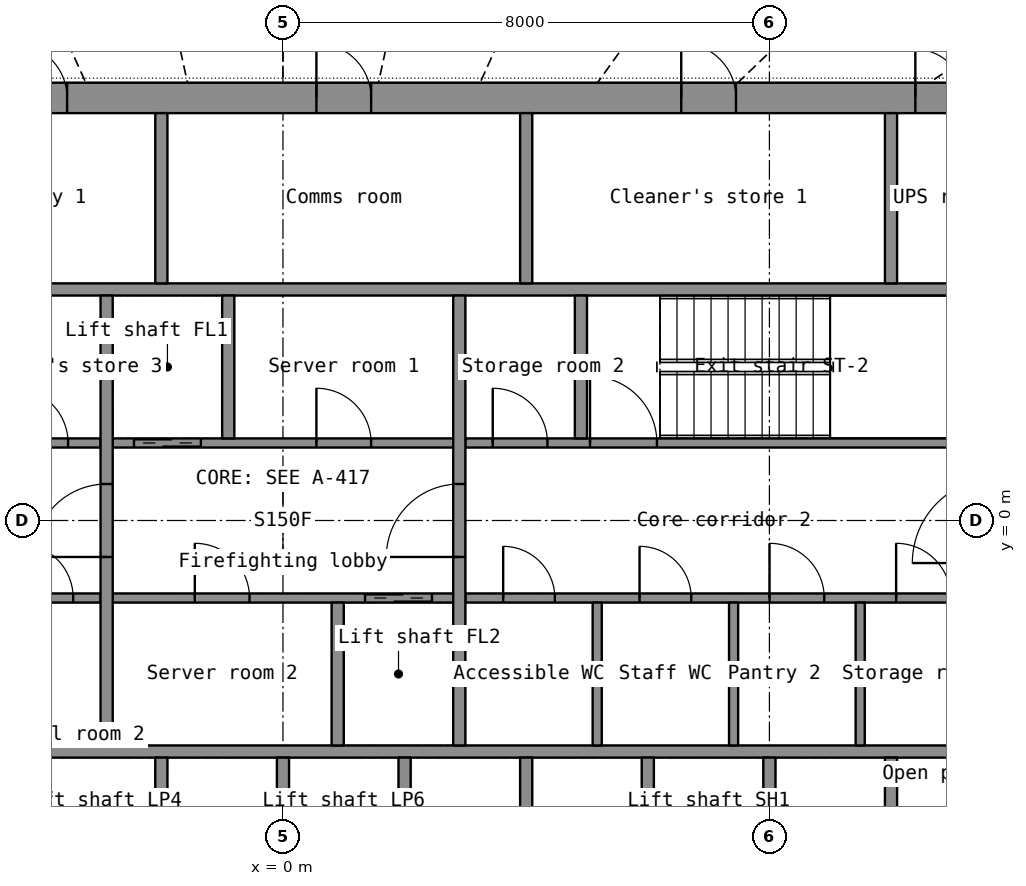
"""IFC4 building model, lengths in metres.
Left out: names, types, materials, properties, quantities, classifications, styles, units other than length and angle.
Written with IfcOpenShell. Run it as: python <this file> out.ifc"""

import sys

from ifc_helpers import new_model, si_unit, direction, frame, frame_2d, origin, place, context, subcontext, project, spatial, rectangle, extrude, element, fill, save


model = new_model("IFC4")
c1 = context("Model", 3, precision=1e-05, world=origin(), true_north=direction((0.0, 1.0)))
c2 = subcontext(c1, "Body", "Model", "MODEL_VIEW")
j1 = project(units=[si_unit("LENGTHUNIT", "METRE"), si_unit("PLANEANGLEUNIT", "RADIAN")], contexts=[c1])
p1 = place(None, origin())
s1 = spatial("IfcSite", under=j1, at=p1, CompositionType="ELEMENT")
p2 = place(p1, origin())
s2 = spatial("IfcBuilding", under=s1, at=p2, CompositionType="ELEMENT")
p3 = place(p2, frame((0.0, 0.0, 123.0)))
s3 = spatial("IfcBuildingStorey", under=s2, at=p3, CompositionType="ELEMENT", Elevation=123.0)
p4 = place(p3, frame((-11.5, 6.95, 0.0), z_axis=(0.0, 0.0, 1.0), x_axis=(1.0, 0.0, 0.0)))
e1 = element("IfcWall", 1, at=p4, inside=s3, PredefinedType="SHEAR", context=c2, shape_type="SweptSolid", body=[
    extrude(rectangle(XDim=23.0, YDim=0.5, at=frame_2d((11.5, 0.0))), origin(), (0.0, 0.0, 1.0), 3.3),
])
p5 = place(p4, frame((1.95, 0.0, 0.0)))
e2 = element("IfcOpeningElement", 2, at=p5, cuts=e1, PredefinedType="OPENING", context=c2, shape_type="SweptSolid", body=[
    extrude(rectangle(XDim=1.1, YDim=2.2, at=frame_2d((0.55, 1.1))), frame((0.0, 0.26, 0.0), z_axis=(0.0, -1.0, 0.0), x_axis=(1.0, 0.0, 0.0)), (0.0, 0.0, 1.0), 0.52),
])
p6 = place(p4, frame((7.05, 0.0, 0.0)))
e3 = element("IfcOpeningElement", 3, at=p6, cuts=e1, PredefinedType="OPENING", context=c2, shape_type="SweptSolid", body=[
    extrude(rectangle(XDim=0.9, YDim=2.1, at=frame_2d((0.45, 1.05))), frame((0.0, 0.26, 0.0), z_axis=(0.0, -1.0, 0.0), x_axis=(1.0, 0.0, 0.0)), (0.0, 0.0, 1.0), 0.52),
])
p7 = place(p4, frame((12.05, 0.0, 0.0)))
e4 = element("IfcOpeningElement", 4, at=p7, cuts=e1, PredefinedType="OPENING", context=c2, shape_type="SweptSolid", body=[
    extrude(rectangle(XDim=0.9, YDim=2.1, at=frame_2d((0.45, 1.05))), frame((0.0, 0.26, 0.0), z_axis=(0.0, -1.0, 0.0), x_axis=(1.0, 0.0, 0.0)), (0.0, 0.0, 1.0), 0.52),
])
p8 = place(p4, frame((18.05, 0.0, 0.0)))
e5 = element("IfcOpeningElement", 5, at=p8, cuts=e1, PredefinedType="OPENING", context=c2, shape_type="SweptSolid", body=[
    extrude(rectangle(XDim=0.9, YDim=2.1, at=frame_2d((0.45, 1.05))), frame((0.0, 0.26, 0.0), z_axis=(0.0, -1.0, 0.0), x_axis=(1.0, 0.0, 0.0)), (0.0, 0.0, 1.0), 0.52),
])
p9 = place(p4, frame((0.3, 0.0, 0.0)))
e6 = element("IfcOpeningElement", 6, at=p9, cuts=e1, PredefinedType="OPENING", context=c2, shape_type="SweptSolid", body=[
    extrude(rectangle(XDim=0.8, YDim=2.05, at=frame_2d((0.4, 1.025))), frame((0.0, 0.26, 0.0), z_axis=(0.0, -1.0, 0.0), x_axis=(1.0, 0.0, 0.0)), (0.0, 0.0, 1.0), 0.52),
])
p10 = place(p4, frame((21.9, 0.0, 0.0)))
e7 = element("IfcOpeningElement", 7, at=p10, cuts=e1, PredefinedType="OPENING", context=c2, shape_type="SweptSolid", body=[
    extrude(rectangle(XDim=0.8, YDim=2.05, at=frame_2d((0.4, 1.025))), frame((0.0, 0.26, 0.0), z_axis=(0.0, -1.0, 0.0), x_axis=(1.0, 0.0, 0.0)), (0.0, 0.0, 1.0), 0.52),
])
for number, where, z_axis, x_axis in (
    (8, (-11.5, -3.8, 0.0), (0.0, 0.0, 1.0), (1.0, 0.0, 0.0)),
    (9, (-11.5, 3.8, 0.0), (0.0, 0.0, 1.0), (1.0, 0.0, 0.0)),
):
    element("IfcWall", number, at=place(p3, frame(where, z_axis=z_axis, x_axis=x_axis)), inside=s3, PredefinedType="SHEAR", context=c2, shape_type="SweptSolid", body=[
        extrude(rectangle(XDim=23.0, YDim=0.2, at=frame_2d((11.5, 0.0))), origin(), (0.0, 0.0, 1.0), 3.3),
    ])
for number, where, z_axis, x_axis in (
    (10, (-2.0, -6.7, 0.0), (0.0, 0.0, 1.0), (0.0, 1.0, 0.0)),
    (11, (0.0, -6.7, 0.0), (0.0, 0.0, 1.0), (0.0, 1.0, 0.0)),
    (12, (2.0, -6.7, 0.0), (0.0, 0.0, 1.0), (0.0, 1.0, 0.0)),
    (13, (4.0, -6.7, 0.0), (0.0, 0.0, 1.0), (0.0, 1.0, 0.0)),
    (14, (6.0, -6.7, 0.0), (0.0, 0.0, 1.0), (0.0, 1.0, 0.0)),
    (15, (8.0, -6.7, 0.0), (0.0, 0.0, 1.0), (0.0, 1.0, 0.0)),
    (16, (10.0, -6.7, 0.0), (0.0, 0.0, 1.0), (0.0, 1.0, 0.0)),
    (17, (10.0, 3.9, 0.0), (0.0, 0.0, 1.0), (0.0, 1.0, 0.0)),
):
    element("IfcWall", number, at=place(p3, frame(where, z_axis=z_axis, x_axis=x_axis)), inside=s3, PredefinedType="SHEAR", context=c2, shape_type="SweptSolid", body=[
        extrude(rectangle(XDim=2.8, YDim=0.2, at=frame_2d((1.4, 0.0))), origin(), (0.0, 0.0, 1.0), 3.3),
    ])
for number, where, z_axis, x_axis in (
    (18, (-2.0, 3.9, 0.0), (0.0, 0.0, 1.0), (0.0, 1.0, 0.0)),
    (19, (4.0, 3.9, 0.0), (0.0, 0.0, 1.0), (0.0, 1.0, 0.0)),
):
    element("IfcWall", number, at=place(p3, frame(where, z_axis=z_axis, x_axis=x_axis)), inside=s3, PredefinedType="PARTITIONING", context=c2, shape_type="SweptSolid", body=[
        extrude(rectangle(XDim=2.8, YDim=0.2, at=frame_2d((1.4, 0.0))), origin(), (0.0, 0.0, 1.0), 3.3),
    ])
p11 = place(p3, frame((-11.5, -1.275, 0.0), z_axis=(0.0, 0.0, 1.0), x_axis=(1.0, 0.0, 0.0)))
e20 = element("IfcWall", 20, at=p11, inside=s3, PredefinedType="SHEAR", context=c2, shape_type="SweptSolid", body=[
    extrude(rectangle(XDim=8.5, YDim=0.15, at=frame_2d((4.25, 0.0))), origin(), (0.0, 0.0, 1.0), 3.3),
])
p12 = place(p11, frame((5.35, 0.0, 0.0)))
e21 = element("IfcOpeningElement", 21, at=p12, cuts=e20, PredefinedType="OPENING", context=c2, shape_type="SweptSolid", body=[
    extrude(rectangle(XDim=1.1, YDim=2.15, at=frame_2d((0.55, 1.075))), frame((0.0, 0.085, 0.0), z_axis=(0.0, -1.0, 0.0), x_axis=(1.0, 0.0, 0.0)), (0.0, 0.0, 1.0), 0.17),
])
p13 = place(p11, frame((7.15, 0.0, 0.0)))
e22 = element("IfcOpeningElement", 22, at=p13, cuts=e20, PredefinedType="OPENING", context=c2, shape_type="SweptSolid", body=[
    extrude(rectangle(XDim=0.9, YDim=2.1, at=frame_2d((0.45, 1.05))), frame((0.0, 0.085, 0.0), z_axis=(0.0, -1.0, 0.0), x_axis=(1.0, 0.0, 0.0)), (0.0, 0.0, 1.0), 0.17),
])
p14 = place(p3, frame((-2.8, -1.275, 0.0), z_axis=(0.0, 0.0, 1.0), x_axis=(1.0, 0.0, 0.0)))
e23 = element("IfcWall", 23, at=p14, inside=s3, PredefinedType="SHEAR", context=c2, shape_type="SweptSolid", body=[
    extrude(rectangle(XDim=5.6, YDim=0.15, at=frame_2d((2.8, 0.0))), origin(), (0.0, 0.0, 1.0), 3.3),
])
p15 = place(p14, frame((4.15, 0.0, 0.0)))
e24 = element("IfcOpeningElement", 24, at=p15, cuts=e23, PredefinedType="OPENING", context=c2, shape_type="SweptSolid", body=[
    extrude(rectangle(XDim=1.1, YDim=2.2, at=frame_2d((0.55, 1.1))), frame((0.0, 0.085, 0.0), z_axis=(0.0, -1.0, 0.0), x_axis=(1.0, 0.0, 0.0)), (0.0, 0.0, 1.0), 0.17),
])
p16 = place(p14, frame((1.35, 0.0, 0.0)))
e25 = element("IfcOpeningElement", 25, at=p16, cuts=e23, PredefinedType="OPENING", context=c2, shape_type="SweptSolid", body=[
    extrude(rectangle(XDim=0.9, YDim=2.1, at=frame_2d((0.45, 1.05))), frame((0.0, 0.085, 0.0), z_axis=(0.0, -1.0, 0.0), x_axis=(1.0, 0.0, 0.0)), (0.0, 0.0, 1.0), 0.17),
])
p17 = place(p3, frame((3.0, -1.275, 0.0), z_axis=(0.0, 0.0, 1.0), x_axis=(1.0, 0.0, 0.0)))
e26 = element("IfcWall", 26, at=p17, inside=s3, PredefinedType="PARTITIONING", context=c2, shape_type="SweptSolid", body=[
    extrude(rectangle(XDim=8.5, YDim=0.15, at=frame_2d((4.25, 0.0))), origin(), (0.0, 0.0, 1.0), 3.3),
])
p18 = place(p17, frame((0.622, 0.0, 0.0)))
e27 = element("IfcOpeningElement", 27, at=p18, cuts=e26, PredefinedType="OPENING", context=c2, shape_type="SweptSolid", body=[
    extrude(rectangle(XDim=0.85, YDim=2.1, at=frame_2d((0.425, 1.05))), frame((0.0, 0.085, 0.0), z_axis=(0.0, -1.0, 0.0), x_axis=(1.0, 0.0, 0.0)), (0.0, 0.0, 1.0), 0.17),
])
p19 = place(p17, frame((2.865, 0.0, 0.0)))
e28 = element("IfcOpeningElement", 28, at=p19, cuts=e26, PredefinedType="OPENING", context=c2, shape_type="SweptSolid", body=[
    extrude(rectangle(XDim=0.85, YDim=2.1, at=frame_2d((0.425, 1.05))), frame((0.0, 0.085, 0.0), z_axis=(0.0, -1.0, 0.0), x_axis=(1.0, 0.0, 0.0)), (0.0, 0.0, 1.0), 0.17),
])
p20 = place(p17, frame((5.002, 0.0, 0.0)))
e29 = element("IfcOpeningElement", 29, at=p20, cuts=e26, PredefinedType="OPENING", context=c2, shape_type="SweptSolid", body=[
    extrude(rectangle(XDim=0.9, YDim=2.1, at=frame_2d((0.45, 1.05))), frame((0.0, 0.085, 0.0), z_axis=(0.0, -1.0, 0.0), x_axis=(1.0, 0.0, 0.0)), (0.0, 0.0, 1.0), 0.17),
])
p21 = place(p17, frame((7.084, 0.0, 0.0)))
e30 = element("IfcOpeningElement", 30, at=p21, cuts=e26, PredefinedType="OPENING", context=c2, shape_type="SweptSolid", body=[
    extrude(rectangle(XDim=0.9, YDim=2.1, at=frame_2d((0.45, 1.05))), frame((0.0, 0.085, 0.0), z_axis=(0.0, -1.0, 0.0), x_axis=(1.0, 0.0, 0.0)), (0.0, 0.0, 1.0), 0.17),
])
p22 = place(p3, frame((-11.5, 1.275, 0.0), z_axis=(0.0, 0.0, 1.0), x_axis=(1.0, 0.0, 0.0)))
e31 = element("IfcWall", 31, at=p22, inside=s3, PredefinedType="PARTITIONING", context=c2, shape_type="SweptSolid", body=[
    extrude(rectangle(XDim=8.5, YDim=0.15, at=frame_2d((4.25, 0.0))), origin(), (0.0, 0.0, 1.0), 3.3),
])
p23 = place(p22, frame((1.133, 0.0, 0.0)))
e32 = element("IfcOpeningElement", 32, at=p23, cuts=e31, PredefinedType="OPENING", context=c2, shape_type="SweptSolid", body=[
    extrude(rectangle(XDim=0.85, YDim=2.1, at=frame_2d((0.425, 1.05))), frame((0.0, 0.085, 0.0), z_axis=(0.0, -1.0, 0.0), x_axis=(1.0, 0.0, 0.0)), (0.0, 0.0, 1.0), 0.17),
])
p24 = place(p22, frame((4.399, 0.0, 0.0)))
e33 = element("IfcOpeningElement", 33, at=p24, cuts=e31, PredefinedType="OPENING", context=c2, shape_type="SweptSolid", body=[
    extrude(rectangle(XDim=0.85, YDim=2.1, at=frame_2d((0.425, 1.05))), frame((0.0, 0.085, 0.0), z_axis=(0.0, -1.0, 0.0), x_axis=(1.0, 0.0, 0.0)), (0.0, 0.0, 1.0), 0.17),
])
p25 = place(p22, frame((7.066, 0.0, 0.0)))
e34 = element("IfcOpeningElement", 34, at=p25, cuts=e31, PredefinedType="OPENING", context=c2, shape_type="SweptSolid", body=[
    extrude(rectangle(XDim=0.9, YDim=2.1, at=frame_2d((0.45, 1.05))), frame((0.0, 0.085, 0.0), z_axis=(0.0, -1.0, 0.0), x_axis=(1.0, 0.0, 0.0)), (0.0, 0.0, 1.0), 0.17),
])
p26 = place(p3, frame((-2.8, 1.275, 0.0), z_axis=(0.0, 0.0, 1.0), x_axis=(1.0, 0.0, 0.0)))
e35 = element("IfcWall", 35, at=p26, inside=s3, PredefinedType="SHEAR", context=c2, shape_type="SweptSolid", body=[
    extrude(rectangle(XDim=5.6, YDim=0.15, at=frame_2d((2.8, 0.0))), origin(), (0.0, 0.0, 1.0), 3.3),
])
p27 = place(p26, frame((0.35, 0.0, 0.0)))
e36 = element("IfcOpeningElement", 36, at=p27, cuts=e35, PredefinedType="OPENING", context=c2, shape_type="SweptSolid", body=[
    extrude(rectangle(XDim=1.1, YDim=2.2, at=frame_2d((0.55, 1.1))), frame((0.0, 0.085, 0.0), z_axis=(0.0, -1.0, 0.0), x_axis=(1.0, 0.0, 0.0)), (0.0, 0.0, 1.0), 0.17),
])
p28 = place(p26, frame((3.35, 0.0, 0.0)))
e37 = element("IfcOpeningElement", 37, at=p28, cuts=e35, PredefinedType="OPENING", context=c2, shape_type="SweptSolid", body=[
    extrude(rectangle(XDim=0.9, YDim=2.1, at=frame_2d((0.45, 1.05))), frame((0.0, 0.085, 0.0), z_axis=(0.0, -1.0, 0.0), x_axis=(1.0, 0.0, 0.0)), (0.0, 0.0, 1.0), 0.17),
])
p29 = place(p3, frame((3.0, 1.275, 0.0), z_axis=(0.0, 0.0, 1.0), x_axis=(1.0, 0.0, 0.0)))
e38 = element("IfcWall", 38, at=p29, inside=s3, PredefinedType="SHEAR", context=c2, shape_type="SweptSolid", body=[
    extrude(rectangle(XDim=8.5, YDim=0.15, at=frame_2d((4.25, 0.0))), origin(), (0.0, 0.0, 1.0), 3.3),
])
p30 = place(p29, frame((2.05, 0.0, 0.0)))
e39 = element("IfcOpeningElement", 39, at=p30, cuts=e38, PredefinedType="OPENING", context=c2, shape_type="SweptSolid", body=[
    extrude(rectangle(XDim=1.1, YDim=2.15, at=frame_2d((0.55, 1.075))), frame((0.0, 0.085, 0.0), z_axis=(0.0, -1.0, 0.0), x_axis=(1.0, 0.0, 0.0)), (0.0, 0.0, 1.0), 0.17),
])
p31 = place(p29, frame((0.45, 0.0, 0.0)))
e40 = element("IfcOpeningElement", 40, at=p31, cuts=e38, PredefinedType="OPENING", context=c2, shape_type="SweptSolid", body=[
    extrude(rectangle(XDim=0.9, YDim=2.1, at=frame_2d((0.45, 1.05))), frame((0.0, 0.085, 0.0), z_axis=(0.0, -1.0, 0.0), x_axis=(1.0, 0.0, 0.0)), (0.0, 0.0, 1.0), 0.17),
])
p32 = place(p3, frame((-2.9, -3.7, 0.0), z_axis=(0.0, 0.0, 1.0), x_axis=(0.0, 1.0, 0.0)))
e41 = element("IfcWall", 41, at=p32, inside=s3, PredefinedType="SHEAR", context=c2, shape_type="SweptSolid", body=[
    extrude(rectangle(XDim=7.4, YDim=0.2, at=frame_2d((3.7, 0.0))), origin(), (0.0, 0.0, 1.0), 3.3),
])
p33 = place(p32, frame((3.1, 0.0, 0.0)))
e42 = element("IfcOpeningElement", 42, at=p33, cuts=e41, PredefinedType="OPENING", context=c2, shape_type="SweptSolid", body=[
    extrude(rectangle(XDim=1.2, YDim=2.2, at=frame_2d((0.6, 1.1))), frame((0.0, 0.11, 0.0), z_axis=(0.0, -1.0, 0.0), x_axis=(1.0, 0.0, 0.0)), (0.0, 0.0, 1.0), 0.22),
])
p34 = place(p3, frame((2.9, -3.7, 0.0), z_axis=(0.0, 0.0, 1.0), x_axis=(0.0, 1.0, 0.0)))
e43 = element("IfcWall", 43, at=p34, inside=s3, PredefinedType="SHEAR", context=c2, shape_type="SweptSolid", body=[
    extrude(rectangle(XDim=7.4, YDim=0.2, at=frame_2d((3.7, 0.0))), origin(), (0.0, 0.0, 1.0), 3.3),
])
p35 = place(p34, frame((3.1, 0.0, 0.0)))
e44 = element("IfcOpeningElement", 44, at=p35, cuts=e43, PredefinedType="OPENING", context=c2, shape_type="SweptSolid", body=[
    extrude(rectangle(XDim=1.2, YDim=2.2, at=frame_2d((0.6, 1.1))), frame((0.0, 0.11, 0.0), z_axis=(0.0, -1.0, 0.0), x_axis=(1.0, 0.0, 0.0)), (0.0, 0.0, 1.0), 0.22),
])
for number, where, z_axis, x_axis in (
    (45, (-0.9, 1.35, 0.0), (0.0, 0.0, 1.0), (0.0, 1.0, 0.0)),
    (46, (0.9, -3.7, 0.0), (0.0, 0.0, 1.0), (0.0, 1.0, 0.0)),
    (47, (4.9, 1.35, 0.0), (0.0, 0.0, 1.0), (0.0, 1.0, 0.0)),
):
    element("IfcWall", number, at=place(p3, frame(where, z_axis=z_axis, x_axis=x_axis)), inside=s3, PredefinedType="SHEAR", context=c2, shape_type="SweptSolid", body=[
        extrude(rectangle(XDim=2.35, YDim=0.2, at=frame_2d((1.175, 0.0))), origin(), (0.0, 0.0, 1.0), 3.3),
    ])
for number, where, z_axis, x_axis in (
    (48, (5.168, -3.7, 0.0), (0.0, 0.0, 1.0), (0.0, 1.0, 0.0)),
    (49, (7.411, -3.7, 0.0), (0.0, 0.0, 1.0), (0.0, 1.0, 0.0)),
    (50, (9.493, -3.7, 0.0), (0.0, 0.0, 1.0), (0.0, 1.0, 0.0)),
):
    element("IfcWall", number, at=place(p3, frame(where, z_axis=z_axis, x_axis=x_axis)), inside=s3, PredefinedType="PARTITIONING", context=c2, shape_type="SweptSolid", body=[
        extrude(rectangle(XDim=2.35, YDim=0.15, at=frame_2d((1.175, 0.0))), origin(), (0.0, 0.0, 1.0), 3.3),
    ])
p36 = place(p6, origin())
e51 = element("IfcDoor", 51, at=p36, inside=s3, OperationType="SINGLE_SWING_LEFT", PredefinedType="DOOR", context=c2, shape_type="SweptSolid", body=[
    extrude(rectangle(XDim=0.9, YDim=2.1, at=frame_2d((0.45, 1.05))), frame((0.0, 0.025, 0.0), z_axis=(0.0, -1.0, 0.0), x_axis=(1.0, 0.0, 0.0)), (0.0, 0.0, 1.0), 0.05),
])
fill(e3, e51)
p37 = place(p7, origin())
e52 = element("IfcDoor", 52, at=p37, inside=s3, OperationType="SINGLE_SWING_LEFT", PredefinedType="DOOR", context=c2, shape_type="SweptSolid", body=[
    extrude(rectangle(XDim=0.9, YDim=2.1, at=frame_2d((0.45, 1.05))), frame((0.0, 0.025, 0.0), z_axis=(0.0, -1.0, 0.0), x_axis=(1.0, 0.0, 0.0)), (0.0, 0.0, 1.0), 0.05),
])
fill(e4, e52)
p38 = place(p8, origin())
e53 = element("IfcDoor", 53, at=p38, inside=s3, OperationType="SINGLE_SWING_LEFT", PredefinedType="DOOR", context=c2, shape_type="SweptSolid", body=[
    extrude(rectangle(XDim=0.9, YDim=2.1, at=frame_2d((0.45, 1.05))), frame((0.0, 0.025, 0.0), z_axis=(0.0, -1.0, 0.0), x_axis=(1.0, 0.0, 0.0)), (0.0, 0.0, 1.0), 0.05),
])
fill(e5, e53)
p39 = place(p10, origin())
e54 = element("IfcDoor", 54, at=p39, inside=s3, OperationType="SINGLE_SWING_LEFT", PredefinedType="DOOR", context=c2, shape_type="SweptSolid", body=[
    extrude(rectangle(XDim=0.8, YDim=2.05, at=frame_2d((0.4, 1.025))), frame((0.0, 0.025, 0.0), z_axis=(0.0, -1.0, 0.0), x_axis=(1.0, 0.0, 0.0)), (0.0, 0.0, 1.0), 0.05),
])
fill(e7, e54)
p40 = place(p33, origin())
e55 = element("IfcDoor", 55, at=p40, inside=s3, OperationType="SINGLE_SWING_LEFT", PredefinedType="DOOR", context=c2, shape_type="SweptSolid", body=[
    extrude(rectangle(XDim=1.2, YDim=2.2, at=frame_2d((0.6, 1.1))), frame((0.0, 0.025, 0.0), z_axis=(0.0, -1.0, 0.0), x_axis=(1.0, 0.0, 0.0)), (0.0, 0.0, 1.0), 0.05),
])
fill(e42, e55)
p41 = place(p35, origin())
e56 = element("IfcDoor", 56, at=p41, inside=s3, OperationType="SINGLE_SWING_LEFT", PredefinedType="DOOR", context=c2, shape_type="SweptSolid", body=[
    extrude(rectangle(XDim=1.2, YDim=2.2, at=frame_2d((0.6, 1.1))), frame((0.0, 0.025, 0.0), z_axis=(0.0, -1.0, 0.0), x_axis=(1.0, 0.0, 0.0)), (0.0, 0.0, 1.0), 0.05),
])
fill(e44, e56)
p42 = place(p27, origin())
e57 = element("IfcDoor", 57, at=p42, inside=s3, OperationType="DOUBLE_DOOR_SLIDING", PredefinedType="DOOR", context=c2, shape_type="SweptSolid", body=[
    extrude(rectangle(XDim=1.1, YDim=2.2, at=frame_2d((0.55, 1.1))), frame((0.0, 0.025, 0.0), z_axis=(0.0, -1.0, 0.0), x_axis=(1.0, 0.0, 0.0)), (0.0, 0.0, 1.0), 0.05),
])
fill(e36, e57)
p43 = place(p15, origin())
e58 = element("IfcDoor", 58, at=p43, inside=s3, OperationType="DOUBLE_DOOR_SLIDING", PredefinedType="DOOR", context=c2, shape_type="SweptSolid", body=[
    extrude(rectangle(XDim=1.1, YDim=2.2, at=frame_2d((0.55, 1.1))), frame((0.0, 0.025, 0.0), z_axis=(0.0, -1.0, 0.0), x_axis=(1.0, 0.0, 0.0)), (0.0, 0.0, 1.0), 0.05),
])
fill(e24, e58)
p44 = place(p30, origin())
e59 = element("IfcDoor", 59, at=p44, inside=s3, OperationType="SINGLE_SWING_LEFT", PredefinedType="DOOR", context=c2, shape_type="SweptSolid", body=[
    extrude(rectangle(XDim=1.1, YDim=2.15, at=frame_2d((0.55, 1.075))), frame((0.0, 0.025, 0.0), z_axis=(0.0, -1.0, 0.0), x_axis=(1.0, 0.0, 0.0)), (0.0, 0.0, 1.0), 0.05),
])
fill(e39, e59)
p45 = place(p25, origin())
e60 = element("IfcDoor", 60, at=p45, inside=s3, OperationType="SINGLE_SWING_LEFT", PredefinedType="DOOR", context=c2, shape_type="SweptSolid", body=[
    extrude(rectangle(XDim=0.9, YDim=2.1, at=frame_2d((0.45, 1.05))), frame((0.0, 0.025, 0.0), z_axis=(0.0, -1.0, 0.0), x_axis=(1.0, 0.0, 0.0)), (0.0, 0.0, 1.0), 0.05),
])
fill(e34, e60)
p46 = place(p18, origin())
e61 = element("IfcDoor", 61, at=p46, inside=s3, OperationType="SINGLE_SWING_LEFT", PredefinedType="DOOR", context=c2, shape_type="SweptSolid", body=[
    extrude(rectangle(XDim=0.85, YDim=2.1, at=frame_2d((0.425, 1.05))), frame((0.0, 0.025, 0.0), z_axis=(0.0, -1.0, 0.0), x_axis=(1.0, 0.0, 0.0)), (0.0, 0.0, 1.0), 0.05),
])
fill(e27, e61)
p47 = place(p19, origin())
e62 = element("IfcDoor", 62, at=p47, inside=s3, OperationType="SINGLE_SWING_LEFT", PredefinedType="DOOR", context=c2, shape_type="SweptSolid", body=[
    extrude(rectangle(XDim=0.85, YDim=2.1, at=frame_2d((0.425, 1.05))), frame((0.0, 0.025, 0.0), z_axis=(0.0, -1.0, 0.0), x_axis=(1.0, 0.0, 0.0)), (0.0, 0.0, 1.0), 0.05),
])
fill(e28, e62)
p48 = place(p20, origin())
e63 = element("IfcDoor", 63, at=p48, inside=s3, OperationType="SINGLE_SWING_LEFT", PredefinedType="DOOR", context=c2, shape_type="SweptSolid", body=[
    extrude(rectangle(XDim=0.9, YDim=2.1, at=frame_2d((0.45, 1.05))), frame((0.0, 0.025, 0.0), z_axis=(0.0, -1.0, 0.0), x_axis=(1.0, 0.0, 0.0)), (0.0, 0.0, 1.0), 0.05),
])
fill(e29, e63)
p49 = place(p21, origin())
e64 = element("IfcDoor", 64, at=p49, inside=s3, OperationType="SINGLE_SWING_LEFT", PredefinedType="DOOR", context=c2, shape_type="SweptSolid", body=[
    extrude(rectangle(XDim=0.9, YDim=2.1, at=frame_2d((0.45, 1.05))), frame((0.0, 0.025, 0.0), z_axis=(0.0, -1.0, 0.0), x_axis=(1.0, 0.0, 0.0)), (0.0, 0.0, 1.0), 0.05),
])
fill(e30, e64)
p50 = place(p28, origin())
e65 = element("IfcDoor", 65, at=p50, inside=s3, OperationType="SINGLE_SWING_LEFT", PredefinedType="DOOR", context=c2, shape_type="SweptSolid", body=[
    extrude(rectangle(XDim=0.9, YDim=2.1, at=frame_2d((0.45, 1.05))), frame((0.0, 0.025, 0.0), z_axis=(0.0, -1.0, 0.0), x_axis=(1.0, 0.0, 0.0)), (0.0, 0.0, 1.0), 0.05),
])
fill(e37, e65)
p51 = place(p16, origin())
e66 = element("IfcDoor", 66, at=p51, inside=s3, OperationType="SINGLE_SWING_LEFT", PredefinedType="DOOR", context=c2, shape_type="SweptSolid", body=[
    extrude(rectangle(XDim=0.9, YDim=2.1, at=frame_2d((0.45, 1.05))), frame((0.0, 0.025, 0.0), z_axis=(0.0, -1.0, 0.0), x_axis=(1.0, 0.0, 0.0)), (0.0, 0.0, 1.0), 0.05),
])
fill(e25, e66)
p52 = place(p31, origin())
e67 = element("IfcDoor", 67, at=p52, inside=s3, OperationType="SINGLE_SWING_LEFT", PredefinedType="DOOR", context=c2, shape_type="SweptSolid", body=[
    extrude(rectangle(XDim=0.9, YDim=2.1, at=frame_2d((0.45, 1.05))), frame((0.0, 0.025, 0.0), z_axis=(0.0, -1.0, 0.0), x_axis=(1.0, 0.0, 0.0)), (0.0, 0.0, 1.0), 0.05),
])
fill(e40, e67)
p53 = place(p13, origin())
e68 = element("IfcDoor", 68, at=p53, inside=s3, OperationType="SINGLE_SWING_LEFT", PredefinedType="DOOR", context=c2, shape_type="SweptSolid", body=[
    extrude(rectangle(XDim=0.9, YDim=2.1, at=frame_2d((0.45, 1.05))), frame((0.0, 0.025, 0.0), z_axis=(0.0, -1.0, 0.0), x_axis=(1.0, 0.0, 0.0)), (0.0, 0.0, 1.0), 0.05),
])
fill(e22, e68)
save(model, sys.argv[1])
